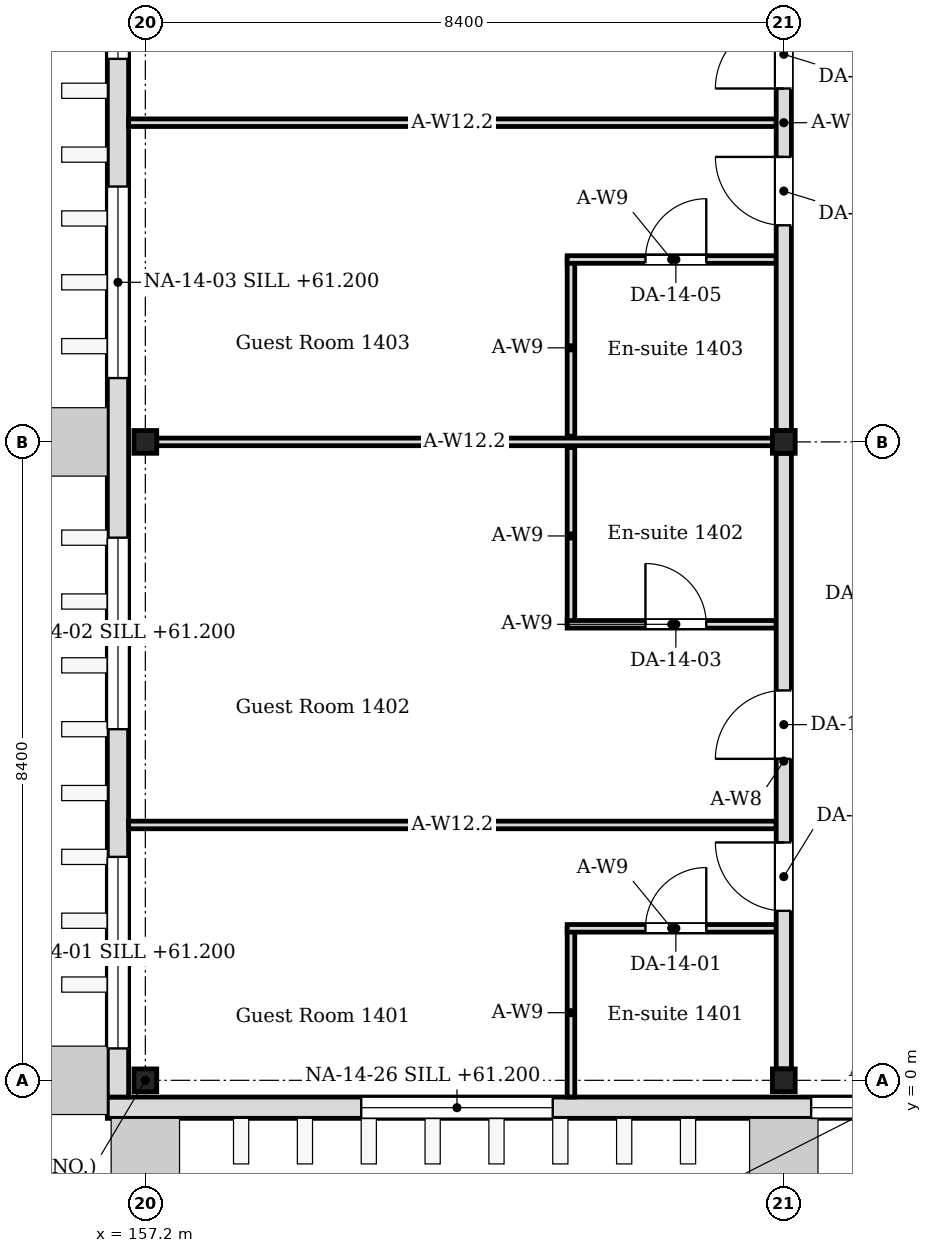
"""IFC4 building model, lengths in metres.
Left out: names, types, materials, properties, quantities, classifications, styles, units other than length and angle.
Written with IfcOpenShell. Run it as: python <this file> out.ifc"""

import sys

from ifc_helpers import new_model, si_unit, direction, frame, frame_2d, origin, origin_2d, place, context, subcontext, project, spatial, rectangle, i_section, extrude, element, fill, save


model = new_model("IFC4")
c1 = context("Model", 3, precision=1e-05, world=origin(), true_north=direction((0.0, 1.0)))
c2 = subcontext(c1, "Body", "Model", "MODEL_VIEW")
j1 = project(units=[si_unit("LENGTHUNIT", "METRE"), si_unit("PLANEANGLEUNIT", "RADIAN")], contexts=[c1])
p1 = place(None, origin())
s1 = spatial("IfcSite", under=j1, at=p1, CompositionType="ELEMENT")
p2 = place(p1, origin())
s2 = spatial("IfcBuilding", under=s1, at=p2, CompositionType="ELEMENT")
p3 = place(p2, frame((0.0, 0.0, 60.6)))
s3 = spatial("IfcBuildingStorey", under=s2, at=p3, CompositionType="ELEMENT", Elevation=60.6)
for number, where, z_axis, x_axis in (
    (1, (157.2, 0.0, 0.0), (0.0, 0.0, 1.0), (1.0, 0.0, 0.0)),
    (2, (157.2, 8.4, 0.0), (0.0, 0.0, 1.0), (1.0, 0.0, 0.0)),
    (3, (165.6, 0.0, 0.0), (0.0, 0.0, 1.0), (1.0, 0.0, 0.0)),
    (4, (165.6, 8.4, 0.0), (0.0, 0.0, 1.0), (1.0, 0.0, 0.0)),
):
    element("IfcColumn", number, at=place(p3, frame(where, z_axis=z_axis, x_axis=x_axis)), inside=s3, PredefinedType="COLUMN", context=c2, shape_type="SweptSolid", body=[
        extrude(i_section(OverallWidth=0.3, OverallDepth=0.3, WebThickness=0.01, FlangeThickness=0.015, FilletRadius=0.013, at=origin_2d()), origin(), (0.0, 0.0, 1.0), 4.2),
    ])
p4 = place(p3, frame((156.84, -0.22, 0.0), z_axis=(0.0, 0.0, 1.0), x_axis=(0.0, 1.0, 0.0)))
e5 = element("IfcWall", 5, at=p4, inside=s3, PredefinedType="SOLIDWALL", context=c2, shape_type="SweptSolid", body=[
    extrude(rectangle(XDim=67.64, YDim=0.28, at=frame_2d((33.82, 0.0))), origin(), (0.0, 0.0, 1.0), 4.05),
])
p5 = place(p4, frame((0.64, 0.0, 0.6)))
e6 = element("IfcOpeningElement", 6, at=p5, cuts=e5, PredefinedType="OPENING", context=c2, shape_type="SweptSolid", body=[
    extrude(rectangle(XDim=2.52, YDim=2.4, at=frame_2d((1.26, 1.2))), frame((0.0, 0.15, 0.0), z_axis=(0.0, -1.0, 0.0), x_axis=(1.0, 0.0, 0.0)), (0.0, 0.0, 1.0), 0.3),
])
p6 = place(p4, frame((4.84, 0.0, 0.6)))
e7 = element("IfcOpeningElement", 7, at=p6, cuts=e5, PredefinedType="OPENING", context=c2, shape_type="SweptSolid", body=[
    extrude(rectangle(XDim=2.52, YDim=2.4, at=frame_2d((1.26, 1.2))), frame((0.0, 0.15, 0.0), z_axis=(0.0, -1.0, 0.0), x_axis=(1.0, 0.0, 0.0)), (0.0, 0.0, 1.0), 0.3),
])
p7 = place(p4, frame((9.46, 0.0, 0.6)))
e8 = element("IfcOpeningElement", 8, at=p7, cuts=e5, PredefinedType="OPENING", context=c2, shape_type="SweptSolid", body=[
    extrude(rectangle(XDim=2.52, YDim=2.4, at=frame_2d((1.26, 1.2))), frame((0.0, 0.15, 0.0), z_axis=(0.0, -1.0, 0.0), x_axis=(1.0, 0.0, 0.0)), (0.0, 0.0, 1.0), 0.3),
])
p8 = place(p4, frame((13.66, 0.0, 0.6)))
e9 = element("IfcOpeningElement", 9, at=p8, cuts=e5, PredefinedType="OPENING", context=c2, shape_type="SweptSolid", body=[
    extrude(rectangle(XDim=2.52, YDim=2.4, at=frame_2d((1.26, 1.2))), frame((0.0, 0.15, 0.0), z_axis=(0.0, -1.0, 0.0), x_axis=(1.0, 0.0, 0.0)), (0.0, 0.0, 1.0), 0.3),
])
p9 = place(p4, frame((17.86, 0.0, 0.6)))
e10 = element("IfcOpeningElement", 10, at=p9, cuts=e5, PredefinedType="OPENING", context=c2, shape_type="SweptSolid", body=[
    extrude(rectangle(XDim=2.52, YDim=2.4, at=frame_2d((1.26, 1.2))), frame((0.0, 0.15, 0.0), z_axis=(0.0, -1.0, 0.0), x_axis=(1.0, 0.0, 0.0)), (0.0, 0.0, 1.0), 0.3),
])
p10 = place(p4, frame((22.06, 0.0, 0.6)))
e11 = element("IfcOpeningElement", 11, at=p10, cuts=e5, PredefinedType="OPENING", context=c2, shape_type="SweptSolid", body=[
    extrude(rectangle(XDim=2.52, YDim=2.4, at=frame_2d((1.26, 1.2))), frame((0.0, 0.15, 0.0), z_axis=(0.0, -1.0, 0.0), x_axis=(1.0, 0.0, 0.0)), (0.0, 0.0, 1.0), 0.3),
])
p11 = place(p4, frame((25.84, 0.0, 0.6)))
e12 = element("IfcOpeningElement", 12, at=p11, cuts=e5, PredefinedType="OPENING", context=c2, shape_type="SweptSolid", body=[
    extrude(rectangle(XDim=2.52, YDim=2.4, at=frame_2d((1.26, 1.2))), frame((0.0, 0.15, 0.0), z_axis=(0.0, -1.0, 0.0), x_axis=(1.0, 0.0, 0.0)), (0.0, 0.0, 1.0), 0.3),
])
p12 = place(p4, frame((30.04, 0.0, 0.6)))
e13 = element("IfcOpeningElement", 13, at=p12, cuts=e5, PredefinedType="OPENING", context=c2, shape_type="SweptSolid", body=[
    extrude(rectangle(XDim=2.52, YDim=2.4, at=frame_2d((1.26, 1.2))), frame((0.0, 0.15, 0.0), z_axis=(0.0, -1.0, 0.0), x_axis=(1.0, 0.0, 0.0)), (0.0, 0.0, 1.0), 0.3),
])
p13 = place(p4, frame((34.66, 0.0, 0.6)))
e14 = element("IfcOpeningElement", 14, at=p13, cuts=e5, PredefinedType="OPENING", context=c2, shape_type="SweptSolid", body=[
    extrude(rectangle(XDim=2.52, YDim=2.4, at=frame_2d((1.26, 1.2))), frame((0.0, 0.15, 0.0), z_axis=(0.0, -1.0, 0.0), x_axis=(1.0, 0.0, 0.0)), (0.0, 0.0, 1.0), 0.3),
])
p14 = place(p4, frame((38.86, 0.0, 0.6)))
e15 = element("IfcOpeningElement", 15, at=p14, cuts=e5, PredefinedType="OPENING", context=c2, shape_type="SweptSolid", body=[
    extrude(rectangle(XDim=2.52, YDim=2.4, at=frame_2d((1.26, 1.2))), frame((0.0, 0.15, 0.0), z_axis=(0.0, -1.0, 0.0), x_axis=(1.0, 0.0, 0.0)), (0.0, 0.0, 1.0), 0.3),
])
p15 = place(p4, frame((42.64, 0.0, 0.6)))
e16 = element("IfcOpeningElement", 16, at=p15, cuts=e5, PredefinedType="OPENING", context=c2, shape_type="SweptSolid", body=[
    extrude(rectangle(XDim=2.52, YDim=2.4, at=frame_2d((1.26, 1.2))), frame((0.0, 0.15, 0.0), z_axis=(0.0, -1.0, 0.0), x_axis=(1.0, 0.0, 0.0)), (0.0, 0.0, 1.0), 0.3),
])
p16 = place(p4, frame((46.84, 0.0, 0.6)))
e17 = element("IfcOpeningElement", 17, at=p16, cuts=e5, PredefinedType="OPENING", context=c2, shape_type="SweptSolid", body=[
    extrude(rectangle(XDim=2.52, YDim=2.4, at=frame_2d((1.26, 1.2))), frame((0.0, 0.15, 0.0), z_axis=(0.0, -1.0, 0.0), x_axis=(1.0, 0.0, 0.0)), (0.0, 0.0, 1.0), 0.3),
])
p17 = place(p4, frame((51.46, 0.0, 0.6)))
e18 = element("IfcOpeningElement", 18, at=p17, cuts=e5, PredefinedType="OPENING", context=c2, shape_type="SweptSolid", body=[
    extrude(rectangle(XDim=2.52, YDim=2.4, at=frame_2d((1.26, 1.2))), frame((0.0, 0.15, 0.0), z_axis=(0.0, -1.0, 0.0), x_axis=(1.0, 0.0, 0.0)), (0.0, 0.0, 1.0), 0.3),
])
p18 = place(p4, frame((55.66, 0.0, 0.6)))
e19 = element("IfcOpeningElement", 19, at=p18, cuts=e5, PredefinedType="OPENING", context=c2, shape_type="SweptSolid", body=[
    extrude(rectangle(XDim=2.52, YDim=2.4, at=frame_2d((1.26, 1.2))), frame((0.0, 0.15, 0.0), z_axis=(0.0, -1.0, 0.0), x_axis=(1.0, 0.0, 0.0)), (0.0, 0.0, 1.0), 0.3),
])
p19 = place(p4, frame((59.86, 0.0, 0.6)))
e20 = element("IfcOpeningElement", 20, at=p19, cuts=e5, PredefinedType="OPENING", context=c2, shape_type="SweptSolid", body=[
    extrude(rectangle(XDim=2.52, YDim=2.4, at=frame_2d((1.26, 1.2))), frame((0.0, 0.15, 0.0), z_axis=(0.0, -1.0, 0.0), x_axis=(1.0, 0.0, 0.0)), (0.0, 0.0, 1.0), 0.3),
])
p20 = place(p4, frame((64.06, 0.0, 0.6)))
e21 = element("IfcOpeningElement", 21, at=p20, cuts=e5, PredefinedType="OPENING", context=c2, shape_type="SweptSolid", body=[
    extrude(rectangle(XDim=2.52, YDim=2.4, at=frame_2d((1.26, 1.2))), frame((0.0, 0.15, 0.0), z_axis=(0.0, -1.0, 0.0), x_axis=(1.0, 0.0, 0.0)), (0.0, 0.0, 1.0), 0.3),
])
p21 = place(p3, frame((156.7, -0.36, 0.0), z_axis=(0.0, 0.0, 1.0), x_axis=(1.0, 0.0, 0.0)))
e22 = element("IfcWall", 22, at=p21, inside=s3, PredefinedType="SOLIDWALL", context=c2, shape_type="SweptSolid", body=[
    extrude(rectangle(XDim=20.2, YDim=0.28, at=frame_2d((10.1, 0.0))), origin(), (0.0, 0.0, 1.0), 4.05),
])
p22 = place(p21, frame((9.26, 0.0, 0.6)))
e23 = element("IfcOpeningElement", 23, at=p22, cuts=e22, PredefinedType="OPENING", context=c2, shape_type="SweptSolid", body=[
    extrude(rectangle(XDim=1.68, YDim=2.4, at=frame_2d((0.84, 1.2))), frame((0.0, 0.15, 0.0), z_axis=(0.0, -1.0, 0.0), x_axis=(1.0, 0.0, 0.0)), (0.0, 0.0, 1.0), 0.3),
])
p23 = place(p21, frame((3.34, 0.0, 0.6)))
e24 = element("IfcOpeningElement", 24, at=p23, cuts=e22, PredefinedType="OPENING", context=c2, shape_type="SweptSolid", body=[
    extrude(rectangle(XDim=2.52, YDim=2.4, at=frame_2d((1.26, 1.2))), frame((0.0, 0.15, 0.0), z_axis=(0.0, -1.0, 0.0), x_axis=(1.0, 0.0, 0.0)), (0.0, 0.0, 1.0), 0.3),
])
p24 = place(p3, frame((162.8, -0.22, 0.0), z_axis=(0.0, 0.0, 1.0), x_axis=(0.0, 1.0, 0.0)))
e25 = element("IfcWall", 25, at=p24, inside=s3, PredefinedType="PARTITIONING", context=c2, shape_type="SweptSolid", body=[
    extrude(rectangle(XDim=2.22, YDim=0.1, at=frame_2d((1.11, 0.0))), origin(), (0.0, 0.0, 1.0), 4.05),
])
p25 = place(p3, frame((162.75, 2.0, 0.0), z_axis=(0.0, 0.0, 1.0), x_axis=(1.0, 0.0, 0.0)))
e26 = element("IfcWall", 26, at=p25, inside=s3, PredefinedType="PARTITIONING", context=c2, shape_type="SweptSolid", body=[
    extrude(rectangle(XDim=2.75, YDim=0.1, at=frame_2d((1.375, 0.0))), origin(), (0.0, 0.0, 1.0), 4.05),
])
p26 = place(p25, frame((1.03, 0.0, 0.0)))
e27 = element("IfcOpeningElement", 27, at=p26, cuts=e26, PredefinedType="OPENING", context=c2, shape_type="SweptSolid", body=[
    extrude(rectangle(XDim=0.8, YDim=2.1, at=frame_2d((0.4, 1.05))), frame((0.0, 0.06, 0.0), z_axis=(0.0, -1.0, 0.0), x_axis=(1.0, 0.0, 0.0)), (0.0, 0.0, 1.0), 0.12),
])
p27 = place(p3, frame((162.8, 6.0, 0.0), z_axis=(0.0, 0.0, 1.0), x_axis=(0.0, 1.0, 0.0)))
e28 = element("IfcWall", 28, at=p27, inside=s3, PredefinedType="PARTITIONING", context=c2, shape_type="SweptSolid", body=[
    extrude(rectangle(XDim=2.325, YDim=0.1, at=frame_2d((1.163, 0.0))), origin(), (0.0, 0.0, 1.0), 4.05),
])
p28 = place(p3, frame((162.75, 6.0, 0.0), z_axis=(0.0, 0.0, 1.0), x_axis=(1.0, 0.0, 0.0)))
e29 = element("IfcWall", 29, at=p28, inside=s3, PredefinedType="PARTITIONING", context=c2, shape_type="SweptSolid", body=[
    extrude(rectangle(XDim=2.75, YDim=0.1, at=frame_2d((1.375, 0.0))), origin(), (0.0, 0.0, 1.0), 4.05),
])
p29 = place(p28, frame((1.03, 0.0, 0.0)))
e30 = element("IfcOpeningElement", 30, at=p29, cuts=e29, PredefinedType="OPENING", context=c2, shape_type="SweptSolid", body=[
    extrude(rectangle(XDim=0.8, YDim=2.1, at=frame_2d((0.4, 1.05))), frame((0.0, 0.06, 0.0), z_axis=(0.0, -1.0, 0.0), x_axis=(1.0, 0.0, 0.0)), (0.0, 0.0, 1.0), 0.12),
])
p30 = place(p3, frame((162.8, 8.475, 0.0), z_axis=(0.0, 0.0, 1.0), x_axis=(0.0, 1.0, 0.0)))
e31 = element("IfcWall", 31, at=p30, inside=s3, PredefinedType="PARTITIONING", context=c2, shape_type="SweptSolid", body=[
    extrude(rectangle(XDim=2.325, YDim=0.1, at=frame_2d((1.163, 0.0))), origin(), (0.0, 0.0, 1.0), 4.05),
])
p31 = place(p3, frame((162.75, 10.8, 0.0), z_axis=(0.0, 0.0, 1.0), x_axis=(1.0, 0.0, 0.0)))
e32 = element("IfcWall", 32, at=p31, inside=s3, PredefinedType="PARTITIONING", context=c2, shape_type="SweptSolid", body=[
    extrude(rectangle(XDim=2.75, YDim=0.1, at=frame_2d((1.375, 0.0))), origin(), (0.0, 0.0, 1.0), 4.05),
])
p32 = place(p31, frame((1.03, 0.0, 0.0)))
e33 = element("IfcOpeningElement", 33, at=p32, cuts=e32, PredefinedType="OPENING", context=c2, shape_type="SweptSolid", body=[
    extrude(rectangle(XDim=0.8, YDim=2.1, at=frame_2d((0.4, 1.05))), frame((0.0, 0.06, 0.0), z_axis=(0.0, -1.0, 0.0), x_axis=(1.0, 0.0, 0.0)), (0.0, 0.0, 1.0), 0.12),
])
p33 = place(p3, frame((157.35, 8.4, 0.0), z_axis=(0.0, 0.0, 1.0), x_axis=(1.0, 0.0, 0.0)))
e34 = element("IfcWall", 34, at=p33, inside=s3, PredefinedType="PARTITIONING", context=c2, shape_type="SweptSolid", body=[
    extrude(rectangle(XDim=8.1, YDim=0.1, at=frame_2d((4.05, 0.0))), origin(), (0.0, 0.0, 1.0), 3.55),
])
for number, where, z_axis, x_axis in (
    (35, (156.98, 3.36, 0.0), (0.0, 0.0, 1.0), (1.0, 0.0, 0.0)),
    (36, (156.98, 12.6, 0.0), (0.0, 0.0, 1.0), (1.0, 0.0, 0.0)),
):
    element("IfcWall", number, at=place(p3, frame(where, z_axis=z_axis, x_axis=x_axis)), inside=s3, PredefinedType="PARTITIONING", context=c2, shape_type="SweptSolid", body=[
        extrude(rectangle(XDim=8.52, YDim=0.1, at=frame_2d((4.26, 0.0))), origin(), (0.0, 0.0, 1.0), 3.55),
    ])
p34 = place(p3, frame((165.6, 0.15, 0.0), z_axis=(0.0, 0.0, 1.0), x_axis=(0.0, 1.0, 0.0)))
e37 = element("IfcWall", 37, at=p34, inside=s3, PredefinedType="PARTITIONING", context=c2, shape_type="SweptSolid", body=[
    extrude(rectangle(XDim=8.1, YDim=0.2, at=frame_2d((4.05, 0.0))), origin(), (0.0, 0.0, 1.0), 3.45),
])
p35 = place(p34, frame((2.08, 0.0, 0.0)))
e38 = element("IfcOpeningElement", 38, at=p35, cuts=e37, PredefinedType="OPENING", context=c2, shape_type="SweptSolid", body=[
    extrude(rectangle(XDim=0.9, YDim=2.1, at=frame_2d((0.45, 1.05))), frame((0.0, 0.11, 0.0), z_axis=(0.0, -1.0, 0.0), x_axis=(1.0, 0.0, 0.0)), (0.0, 0.0, 1.0), 0.22),
])
p36 = place(p34, frame((4.08, 0.0, 0.0)))
e39 = element("IfcOpeningElement", 39, at=p36, cuts=e37, PredefinedType="OPENING", context=c2, shape_type="SweptSolid", body=[
    extrude(rectangle(XDim=0.9, YDim=2.1, at=frame_2d((0.45, 1.05))), frame((0.0, 0.11, 0.0), z_axis=(0.0, -1.0, 0.0), x_axis=(1.0, 0.0, 0.0)), (0.0, 0.0, 1.0), 0.22),
])
p37 = place(p3, frame((165.6, 8.55, 0.0), z_axis=(0.0, 0.0, 1.0), x_axis=(0.0, 1.0, 0.0)))
e40 = element("IfcWall", 40, at=p37, inside=s3, PredefinedType="PARTITIONING", context=c2, shape_type="SweptSolid", body=[
    extrude(rectangle(XDim=8.1, YDim=0.2, at=frame_2d((4.05, 0.0))), origin(), (0.0, 0.0, 1.0), 3.45),
])
p38 = place(p37, frame((2.7, 0.0, 0.0)))
e41 = element("IfcOpeningElement", 41, at=p38, cuts=e40, PredefinedType="OPENING", context=c2, shape_type="SweptSolid", body=[
    extrude(rectangle(XDim=0.9, YDim=2.1, at=frame_2d((0.45, 1.05))), frame((0.0, 0.11, 0.0), z_axis=(0.0, -1.0, 0.0), x_axis=(1.0, 0.0, 0.0)), (0.0, 0.0, 1.0), 0.22),
])
p39 = place(p37, frame((4.5, 0.0, 0.0)))
e42 = element("IfcOpeningElement", 42, at=p39, cuts=e40, PredefinedType="OPENING", context=c2, shape_type="SweptSolid", body=[
    extrude(rectangle(XDim=0.9, YDim=2.1, at=frame_2d((0.45, 1.05))), frame((0.0, 0.11, 0.0), z_axis=(0.0, -1.0, 0.0), x_axis=(1.0, 0.0, 0.0)), (0.0, 0.0, 1.0), 0.22),
])
p40 = place(p5, origin())
e43 = element("IfcWindow", 43, at=p40, inside=s3, PartitioningType="SINGLE_PANEL", PredefinedType="WINDOW", context=c2, shape_type="SweptSolid", body=[
    extrude(rectangle(XDim=2.52, YDim=2.4, at=frame_2d((1.26, 1.2))), frame((0.0, 0.03, 0.0), z_axis=(0.0, -1.0, 0.0), x_axis=(1.0, 0.0, 0.0)), (0.0, 0.0, 1.0), 0.06),
])
fill(e6, e43)
p41 = place(p6, origin())
e44 = element("IfcWindow", 44, at=p41, inside=s3, PartitioningType="SINGLE_PANEL", PredefinedType="WINDOW", context=c2, shape_type="SweptSolid", body=[
    extrude(rectangle(XDim=2.52, YDim=2.4, at=frame_2d((1.26, 1.2))), frame((0.0, 0.03, 0.0), z_axis=(0.0, -1.0, 0.0), x_axis=(1.0, 0.0, 0.0)), (0.0, 0.0, 1.0), 0.06),
])
fill(e7, e44)
p42 = place(p7, origin())
e45 = element("IfcWindow", 45, at=p42, inside=s3, PartitioningType="SINGLE_PANEL", PredefinedType="WINDOW", context=c2, shape_type="SweptSolid", body=[
    extrude(rectangle(XDim=2.52, YDim=2.4, at=frame_2d((1.26, 1.2))), frame((0.0, 0.03, 0.0), z_axis=(0.0, -1.0, 0.0), x_axis=(1.0, 0.0, 0.0)), (0.0, 0.0, 1.0), 0.06),
])
fill(e8, e45)
p43 = place(p8, origin())
e46 = element("IfcWindow", 46, at=p43, inside=s3, PartitioningType="SINGLE_PANEL", PredefinedType="WINDOW", context=c2, shape_type="SweptSolid", body=[
    extrude(rectangle(XDim=2.52, YDim=2.4, at=frame_2d((1.26, 1.2))), frame((0.0, 0.03, 0.0), z_axis=(0.0, -1.0, 0.0), x_axis=(1.0, 0.0, 0.0)), (0.0, 0.0, 1.0), 0.06),
])
fill(e9, e46)
p44 = place(p22, origin())
e47 = element("IfcWindow", 47, at=p44, inside=s3, PartitioningType="SINGLE_PANEL", PredefinedType="WINDOW", context=c2, shape_type="SweptSolid", body=[
    extrude(rectangle(XDim=1.68, YDim=2.4, at=frame_2d((0.84, 1.2))), frame((0.0, 0.03, 0.0), z_axis=(0.0, -1.0, 0.0), x_axis=(1.0, 0.0, 0.0)), (0.0, 0.0, 1.0), 0.06),
])
fill(e23, e47)
p45 = place(p23, origin())
e48 = element("IfcWindow", 48, at=p45, inside=s3, PartitioningType="SINGLE_PANEL", PredefinedType="WINDOW", context=c2, shape_type="SweptSolid", body=[
    extrude(rectangle(XDim=2.52, YDim=2.4, at=frame_2d((1.26, 1.2))), frame((0.0, 0.03, 0.0), z_axis=(0.0, -1.0, 0.0), x_axis=(1.0, 0.0, 0.0)), (0.0, 0.0, 1.0), 0.06),
])
fill(e24, e48)
p46 = place(p26, origin())
e49 = element("IfcDoor", 49, at=p46, inside=s3, OperationType="SINGLE_SWING_RIGHT", PredefinedType="DOOR", context=c2, shape_type="SweptSolid", body=[
    extrude(rectangle(XDim=0.8, YDim=2.1, at=frame_2d((0.4, 1.05))), frame((0.0, 0.025, 0.0), z_axis=(0.0, -1.0, 0.0), x_axis=(1.0, 0.0, 0.0)), (0.0, 0.0, 1.0), 0.05),
])
fill(e27, e49)
p47 = place(p35, origin())
e50 = element("IfcDoor", 50, at=p47, inside=s3, OperationType="SINGLE_SWING_RIGHT", PredefinedType="DOOR", context=c2, shape_type="SweptSolid", body=[
    extrude(rectangle(XDim=0.9, YDim=2.1, at=frame_2d((0.45, 1.05))), frame((0.0, 0.025, 0.0), z_axis=(0.0, -1.0, 0.0), x_axis=(1.0, 0.0, 0.0)), (0.0, 0.0, 1.0), 0.05),
])
fill(e38, e50)
p48 = place(p29, origin())
e51 = element("IfcDoor", 51, at=p48, inside=s3, OperationType="SINGLE_SWING_LEFT", PredefinedType="DOOR", context=c2, shape_type="SweptSolid", body=[
    extrude(rectangle(XDim=0.8, YDim=2.1, at=frame_2d((0.4, 1.05))), frame((0.0, 0.025, 0.0), z_axis=(0.0, -1.0, 0.0), x_axis=(1.0, 0.0, 0.0)), (0.0, 0.0, 1.0), 0.05),
])
fill(e30, e51)
p49 = place(p36, origin())
e52 = element("IfcDoor", 52, at=p49, inside=s3, OperationType="SINGLE_SWING_LEFT", PredefinedType="DOOR", context=c2, shape_type="SweptSolid", body=[
    extrude(rectangle(XDim=0.9, YDim=2.1, at=frame_2d((0.45, 1.05))), frame((0.0, 0.025, 0.0), z_axis=(0.0, -1.0, 0.0), x_axis=(1.0, 0.0, 0.0)), (0.0, 0.0, 1.0), 0.05),
])
fill(e39, e52)
p50 = place(p32, origin())
e53 = element("IfcDoor", 53, at=p50, inside=s3, OperationType="SINGLE_SWING_RIGHT", PredefinedType="DOOR", context=c2, shape_type="SweptSolid", body=[
    extrude(rectangle(XDim=0.8, YDim=2.1, at=frame_2d((0.4, 1.05))), frame((0.0, 0.025, 0.0), z_axis=(0.0, -1.0, 0.0), x_axis=(1.0, 0.0, 0.0)), (0.0, 0.0, 1.0), 0.05),
])
fill(e33, e53)
p51 = place(p38, origin())
e54 = element("IfcDoor", 54, at=p51, inside=s3, OperationType="SINGLE_SWING_RIGHT", PredefinedType="DOOR", context=c2, shape_type="SweptSolid", body=[
    extrude(rectangle(XDim=0.9, YDim=2.1, at=frame_2d((0.45, 1.05))), frame((0.0, 0.025, 0.0), z_axis=(0.0, -1.0, 0.0), x_axis=(1.0, 0.0, 0.0)), (0.0, 0.0, 1.0), 0.05),
])
fill(e41, e54)
p52 = place(p39, origin())
e55 = element("IfcDoor", 55, at=p52, inside=s3, OperationType="SINGLE_SWING_LEFT", PredefinedType="DOOR", context=c2, shape_type="SweptSolid", body=[
    extrude(rectangle(XDim=0.9, YDim=2.1, at=frame_2d((0.45, 1.05))), frame((0.0, 0.025, 0.0), z_axis=(0.0, -1.0, 0.0), x_axis=(1.0, 0.0, 0.0)), (0.0, 0.0, 1.0), 0.05),
])
fill(e42, e55)
save(model, sys.argv[1])
